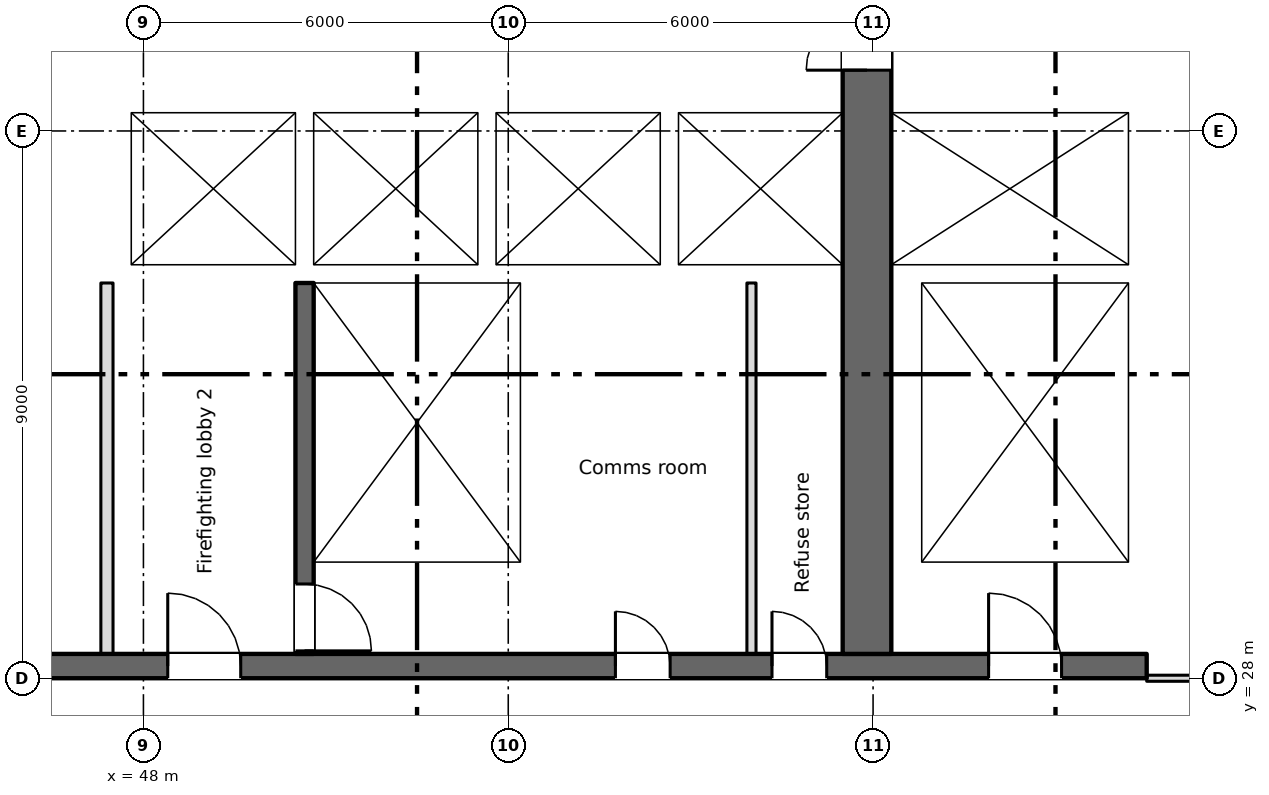
"""IFC4 building model, lengths in metres.
Left out: names, types, materials, properties, quantities, classifications, styles, units other than length and angle.
Written with IfcOpenShell. Run it as: python <this file> out.ifc"""

import sys

from ifc_helpers import new_model, si_unit, direction, frame, frame_2d, origin, place, context, subcontext, project, spatial, rectangle, extrude, element, fill, save


model = new_model("IFC4")
c1 = context("Model", 3, precision=1e-05, world=origin(), true_north=direction((0.0, 1.0)))
c2 = subcontext(c1, "Body", "Model", "MODEL_VIEW")
j1 = project(units=[si_unit("LENGTHUNIT", "METRE"), si_unit("PLANEANGLEUNIT", "RADIAN")], contexts=[c1])
p1 = place(None, origin())
s1 = spatial("IfcSite", under=j1, at=p1, CompositionType="ELEMENT")
p2 = place(p1, origin())
s2 = spatial("IfcBuilding", under=s1, at=p2, CompositionType="ELEMENT")
p3 = place(p2, frame((0.0, 0.0, 128.75)))
s3 = spatial("IfcBuildingStorey", under=s2, at=p3, CompositionType="ELEMENT", Elevation=128.75)
p4 = place(p3, frame((6.7, 28.2, 0.0), z_axis=(0.0, 0.0, 1.0), x_axis=(1.0, 0.0, 0.0)))
e1 = element("IfcWall", 1, at=p4, inside=s3, PredefinedType="SHEAR", context=c2, shape_type="SweptSolid", body=[
    extrude(rectangle(XDim=57.8, YDim=0.4, at=frame_2d((28.9, 0.0))), origin(), (0.0, 0.0, 1.0), 3.35),
])
p5 = place(p4, frame((12.062, 0.0, 0.0)))
e2 = element("IfcOpeningElement", 2, at=p5, cuts=e1, PredefinedType="OPENING", context=c2, shape_type="SweptSolid", body=[
    extrude(rectangle(XDim=0.9, YDim=2.1, at=frame_2d((0.45, 1.05))), frame((0.0, 0.21, 0.0), z_axis=(0.0, -1.0, 0.0), x_axis=(1.0, 0.0, 0.0)), (0.0, 0.0, 1.0), 0.42),
])
p6 = place(p4, frame((14.637, 0.0, 0.0)))
e3 = element("IfcOpeningElement", 3, at=p6, cuts=e1, PredefinedType="OPENING", context=c2, shape_type="SweptSolid", body=[
    extrude(rectangle(XDim=0.9, YDim=2.1, at=frame_2d((0.45, 1.05))), frame((0.0, 0.21, 0.0), z_axis=(0.0, -1.0, 0.0), x_axis=(1.0, 0.0, 0.0)), (0.0, 0.0, 1.0), 0.42),
])
p7 = place(p4, frame((49.062, 0.0, 0.0)))
e4 = element("IfcOpeningElement", 4, at=p7, cuts=e1, PredefinedType="OPENING", context=c2, shape_type="SweptSolid", body=[
    extrude(rectangle(XDim=0.9, YDim=2.1, at=frame_2d((0.45, 1.05))), frame((0.0, 0.21, 0.0), z_axis=(0.0, -1.0, 0.0), x_axis=(1.0, 0.0, 0.0)), (0.0, 0.0, 1.0), 0.42),
])
p8 = place(p4, frame((51.637, 0.0, 0.0)))
e5 = element("IfcOpeningElement", 5, at=p8, cuts=e1, PredefinedType="OPENING", context=c2, shape_type="SweptSolid", body=[
    extrude(rectangle(XDim=0.9, YDim=2.1, at=frame_2d((0.45, 1.05))), frame((0.0, 0.21, 0.0), z_axis=(0.0, -1.0, 0.0), x_axis=(1.0, 0.0, 0.0)), (0.0, 0.0, 1.0), 0.42),
])
p9 = place(p4, frame((1.35, 0.0, 0.0)))
e6 = element("IfcOpeningElement", 6, at=p9, cuts=e1, PredefinedType="OPENING", context=c2, shape_type="SweptSolid", body=[
    extrude(rectangle(XDim=0.9, YDim=2.1, at=frame_2d((0.45, 1.05))), frame((0.0, 0.21, 0.0), z_axis=(0.0, -1.0, 0.0), x_axis=(1.0, 0.0, 0.0)), (0.0, 0.0, 1.0), 0.42),
])
p10 = place(p4, frame((4.7, 0.0, 0.0)))
e7 = element("IfcOpeningElement", 7, at=p10, cuts=e1, PredefinedType="OPENING", context=c2, shape_type="SweptSolid", body=[
    extrude(rectangle(XDim=1.2, YDim=2.1, at=frame_2d((0.6, 1.05))), frame((0.0, 0.21, 0.0), z_axis=(0.0, -1.0, 0.0), x_axis=(1.0, 0.0, 0.0)), (0.0, 0.0, 1.0), 0.42),
])
p11 = place(p4, frame((31.7, 0.0, 0.0)))
e8 = element("IfcOpeningElement", 8, at=p11, cuts=e1, PredefinedType="OPENING", context=c2, shape_type="SweptSolid", body=[
    extrude(rectangle(XDim=1.2, YDim=2.1, at=frame_2d((0.6, 1.05))), frame((0.0, 0.21, 0.0), z_axis=(0.0, -1.0, 0.0), x_axis=(1.0, 0.0, 0.0)), (0.0, 0.0, 1.0), 0.42),
])
p12 = place(p4, frame((55.2, 0.0, 0.0)))
e9 = element("IfcOpeningElement", 9, at=p12, cuts=e1, PredefinedType="OPENING", context=c2, shape_type="SweptSolid", body=[
    extrude(rectangle(XDim=1.2, YDim=2.1, at=frame_2d((0.6, 1.05))), frame((0.0, 0.21, 0.0), z_axis=(0.0, -1.0, 0.0), x_axis=(1.0, 0.0, 0.0)), (0.0, 0.0, 1.0), 0.42),
])
p13 = place(p4, frame((21.7, 0.0, 0.0)))
e10 = element("IfcOpeningElement", 10, at=p13, cuts=e1, PredefinedType="OPENING", context=c2, shape_type="SweptSolid", body=[
    extrude(rectangle(XDim=1.2, YDim=2.1, at=frame_2d((0.6, 1.05))), frame((0.0, 0.21, 0.0), z_axis=(0.0, -1.0, 0.0), x_axis=(1.0, 0.0, 0.0)), (0.0, 0.0, 1.0), 0.42),
])
p14 = place(p4, frame((41.7, 0.0, 0.0)))
e11 = element("IfcOpeningElement", 11, at=p14, cuts=e1, PredefinedType="OPENING", context=c2, shape_type="SweptSolid", body=[
    extrude(rectangle(XDim=1.2, YDim=2.1, at=frame_2d((0.6, 1.05))), frame((0.0, 0.21, 0.0), z_axis=(0.0, -1.0, 0.0), x_axis=(1.0, 0.0, 0.0)), (0.0, 0.0, 1.0), 0.42),
])
p15 = place(p4, frame((24.85, 0.0, 0.0)))
e12 = element("IfcOpeningElement", 12, at=p15, cuts=e1, PredefinedType="OPENING", context=c2, shape_type="SweptSolid", body=[
    extrude(rectangle(XDim=2.4, YDim=2.1, at=frame_2d((1.2, 1.05))), frame((0.0, 0.21, 0.0), z_axis=(0.0, -1.0, 0.0), x_axis=(1.0, 0.0, 0.0)), (0.0, 0.0, 1.0), 0.42),
])
p16 = place(p4, frame((37.35, 0.0, 0.0)))
e13 = element("IfcOpeningElement", 13, at=p16, cuts=e1, PredefinedType="OPENING", context=c2, shape_type="SweptSolid", body=[
    extrude(rectangle(XDim=2.4, YDim=2.1, at=frame_2d((1.2, 1.05))), frame((0.0, 0.21, 0.0), z_axis=(0.0, -1.0, 0.0), x_axis=(1.0, 0.0, 0.0)), (0.0, 0.0, 1.0), 0.42),
])
p17 = place(p4, frame((7.95, 0.0, 0.0)))
e14 = element("IfcOpeningElement", 14, at=p17, cuts=e1, PredefinedType="OPENING", context=c2, shape_type="SweptSolid", body=[
    extrude(rectangle(XDim=2.4, YDim=2.1, at=frame_2d((1.2, 1.05))), frame((0.0, 0.21, 0.0), z_axis=(0.0, -1.0, 0.0), x_axis=(1.0, 0.0, 0.0)), (0.0, 0.0, 1.0), 0.42),
])
p18 = place(p4, frame((28.85, 0.0, 0.0)))
e15 = element("IfcOpeningElement", 15, at=p18, cuts=e1, PredefinedType="OPENING", context=c2, shape_type="SweptSolid", body=[
    extrude(rectangle(XDim=0.9, YDim=2.1, at=frame_2d((0.45, 1.05))), frame((0.0, 0.21, 0.0), z_axis=(0.0, -1.0, 0.0), x_axis=(1.0, 0.0, 0.0)), (0.0, 0.0, 1.0), 0.42),
])
p19 = place(p4, frame((34.85, 0.0, 0.0)))
e16 = element("IfcOpeningElement", 16, at=p19, cuts=e1, PredefinedType="OPENING", context=c2, shape_type="SweptSolid", body=[
    extrude(rectangle(XDim=0.9, YDim=2.1, at=frame_2d((0.45, 1.05))), frame((0.0, 0.21, 0.0), z_axis=(0.0, -1.0, 0.0), x_axis=(1.0, 0.0, 0.0)), (0.0, 0.0, 1.0), 0.42),
])
p20 = place(p3, frame((64.35, 34.8, 0.0), z_axis=(0.0, 0.0, 1.0), x_axis=(0.0, 1.0, 0.0)))
e17 = element("IfcWall", 17, at=p20, inside=s3, PredefinedType="SHEAR", context=c2, shape_type="SweptSolid", body=[
    extrude(rectangle(XDim=10.4, YDim=0.3, at=frame_2d((5.2, 0.0))), origin(), (0.0, 0.0, 1.0), 3.35),
])
p21 = place(p3, frame((59.9, 28.4, 0.0), z_axis=(0.0, 0.0, 1.0), x_axis=(0.0, 1.0, 0.0)))
e18 = element("IfcWall", 18, at=p21, inside=s3, PredefinedType="SHEAR", context=c2, shape_type="SweptSolid", body=[
    extrude(rectangle(XDim=16.8, YDim=0.8, at=frame_2d((8.4, 0.0))), origin(), (0.0, 0.0, 1.0), 3.35),
])
p22 = place(p21, frame((9.6, 0.0, 0.0)))
e19 = element("IfcOpeningElement", 19, at=p22, cuts=e18, PredefinedType="OPENING", context=c2, shape_type="SweptSolid", body=[
    extrude(rectangle(XDim=2.0, YDim=2.1, at=frame_2d((1.0, 1.05))), frame((0.0, 0.41, 0.0), z_axis=(0.0, -1.0, 0.0), x_axis=(1.0, 0.0, 0.0)), (0.0, 0.0, 1.0), 0.82),
])
p23 = place(p21, frame((15.35, 0.0, 0.0)))
e20 = element("IfcOpeningElement", 20, at=p23, cuts=e18, PredefinedType="OPENING", context=c2, shape_type="SweptSolid", body=[
    extrude(rectangle(XDim=1.2, YDim=2.1, at=frame_2d((0.6, 1.05))), frame((0.0, 0.41, 0.0), z_axis=(0.0, -1.0, 0.0), x_axis=(1.0, 0.0, 0.0)), (0.0, 0.0, 1.0), 0.82),
])
p24 = place(p3, frame((50.65, 34.5, 0.0), z_axis=(0.0, 0.0, 1.0), x_axis=(0.0, -1.0, 0.0)))
e21 = element("IfcWall", 21, at=p24, inside=s3, PredefinedType="SHEAR", context=c2, shape_type="SweptSolid", body=[
    extrude(rectangle(XDim=6.1, YDim=0.3, at=frame_2d((3.05, 0.0))), origin(), (0.0, 0.0, 1.0), 3.35),
])
p25 = place(p24, frame((4.95, 0.0, 0.0)))
e22 = element("IfcOpeningElement", 22, at=p25, cuts=e21, PredefinedType="OPENING", context=c2, shape_type="SweptSolid", body=[
    extrude(rectangle(XDim=1.1, YDim=2.1, at=frame_2d((0.55, 1.05))), frame((0.0, 0.16, 0.0), z_axis=(0.0, -1.0, 0.0), x_axis=(1.0, 0.0, 0.0)), (0.0, 0.0, 1.0), 0.32),
])
p26 = place(p3, frame((54.35, 28.4, 0.0), z_axis=(0.0, 0.0, 1.0), x_axis=(0.0, 1.0, 0.0)))
e23 = element("IfcWall", 23, at=p26, inside=s3, PredefinedType="SHEAR", context=c2, shape_type="SweptSolid", body=[
    extrude(rectangle(XDim=6.1, YDim=0.3, at=frame_2d((3.05, 0.0))), origin(), (0.0, 0.0, 1.0), 3.35),
])
p27 = place(p3, frame((60.55, 28.4, 0.0), z_axis=(0.0, 0.0, 1.0), x_axis=(0.0, 1.0, 0.0)))
e24 = element("IfcWall", 24, at=p27, inside=s3, PredefinedType="SHEAR", context=c2, shape_type="SweptSolid", body=[
    extrude(rectangle(XDim=6.1, YDim=0.5, at=frame_2d((3.05, 0.0))), origin(), (0.0, 0.0, 1.0), 3.35),
])
p28 = place(p3, frame((64.35, 28.4, 0.0), z_axis=(0.0, 0.0, 1.0), x_axis=(0.0, 1.0, 0.0)))
e25 = element("IfcWall", 25, at=p28, inside=s3, PredefinedType="SHEAR", context=c2, shape_type="SweptSolid", body=[
    extrude(rectangle(XDim=6.1, YDim=0.3, at=frame_2d((3.05, 0.0))), origin(), (0.0, 0.0, 1.0), 3.35),
])
p29 = place(p3, frame((47.3, 34.65, 0.0), z_axis=(0.0, 0.0, 1.0), x_axis=(1.0, 0.0, 0.0)))
e26 = element("IfcWall", 26, at=p29, inside=s3, PredefinedType="SHEAR", context=c2, shape_type="SweptSolid", body=[
    extrude(rectangle(XDim=12.2, YDim=0.3, at=frame_2d((6.1, 0.0))), origin(), (0.0, 0.0, 1.0), 3.35),
])
p30 = place(p29, frame((1.3, 0.0, 0.0)))
e27 = element("IfcOpeningElement", 27, at=p30, cuts=e26, PredefinedType="OPENING", context=c2, shape_type="SweptSolid", body=[
    extrude(rectangle(XDim=1.1, YDim=2.1, at=frame_2d((0.55, 1.05))), frame((0.0, 0.16, 0.0), z_axis=(0.0, -1.0, 0.0), x_axis=(1.0, 0.0, 0.0)), (0.0, 0.0, 1.0), 0.32),
])
p31 = place(p3, frame((60.3, 34.65, 0.0), z_axis=(0.0, 0.0, 1.0), x_axis=(1.0, 0.0, 0.0)))
e28 = element("IfcWall", 28, at=p31, inside=s3, PredefinedType="SHEAR", context=c2, shape_type="SweptSolid", body=[
    extrude(rectangle(XDim=4.2, YDim=0.3, at=frame_2d((2.1, 0.0))), origin(), (0.0, 0.0, 1.0), 3.35),
])
p32 = place(p3, frame((47.3, 37.45, 0.0), z_axis=(0.0, 0.0, 1.0), x_axis=(1.0, 0.0, 0.0)))
e29 = element("IfcWall", 29, at=p32, inside=s3, PredefinedType="SHEAR", context=c2, shape_type="SweptSolid", body=[
    extrude(rectangle(XDim=12.2, YDim=0.3, at=frame_2d((6.1, 0.0))), origin(), (0.0, 0.0, 1.0), 3.35),
])
p33 = place(p32, frame((4.3, 0.0, 0.0)))
e30 = element("IfcOpeningElement", 30, at=p33, cuts=e29, PredefinedType="OPENING", context=c2, shape_type="SweptSolid", body=[
    extrude(rectangle(XDim=1.1, YDim=2.1, at=frame_2d((0.55, 1.05))), frame((0.0, 0.16, 0.0), z_axis=(0.0, -1.0, 0.0), x_axis=(1.0, 0.0, 0.0)), (0.0, 0.0, 1.0), 0.32),
])
p34 = place(p32, frame((7.3, 0.0, 0.0)))
e31 = element("IfcOpeningElement", 31, at=p34, cuts=e29, PredefinedType="OPENING", context=c2, shape_type="SweptSolid", body=[
    extrude(rectangle(XDim=1.1, YDim=2.1, at=frame_2d((0.55, 1.05))), frame((0.0, 0.16, 0.0), z_axis=(0.0, -1.0, 0.0), x_axis=(1.0, 0.0, 0.0)), (0.0, 0.0, 1.0), 0.32),
])
p35 = place(p32, frame((10.3, 0.0, 0.0)))
e32 = element("IfcOpeningElement", 32, at=p35, cuts=e29, PredefinedType="OPENING", context=c2, shape_type="SweptSolid", body=[
    extrude(rectangle(XDim=1.1, YDim=2.1, at=frame_2d((0.55, 1.05))), frame((0.0, 0.16, 0.0), z_axis=(0.0, -1.0, 0.0), x_axis=(1.0, 0.0, 0.0)), (0.0, 0.0, 1.0), 0.32),
])
p36 = place(p3, frame((60.3, 37.45, 0.0), z_axis=(0.0, 0.0, 1.0), x_axis=(1.0, 0.0, 0.0)))
e33 = element("IfcWall", 33, at=p36, inside=s3, PredefinedType="SHEAR", context=c2, shape_type="SweptSolid", body=[
    extrude(rectangle(XDim=3.9, YDim=0.3, at=frame_2d((1.95, 0.0))), origin(), (0.0, 0.0, 1.0), 3.35),
])
p37 = place(p36, frame((1.4, 0.0, 0.0)))
e34 = element("IfcOpeningElement", 34, at=p37, cuts=e33, PredefinedType="OPENING", context=c2, shape_type="SweptSolid", body=[
    extrude(rectangle(XDim=1.1, YDim=2.1, at=frame_2d((0.55, 1.05))), frame((0.0, 0.16, 0.0), z_axis=(0.0, -1.0, 0.0), x_axis=(1.0, 0.0, 0.0)), (0.0, 0.0, 1.0), 0.32),
])
p38 = place(p3, frame((47.55, 34.8, 0.0), z_axis=(0.0, 0.0, 1.0), x_axis=(0.0, 1.0, 0.0)))
e35 = element("IfcWall", 35, at=p38, inside=s3, PredefinedType="SHEAR", context=c2, shape_type="SweptSolid", body=[
    extrude(rectangle(XDim=2.5, YDim=0.5, at=frame_2d((1.25, 0.0))), origin(), (0.0, 0.0, 1.0), 3.35),
])
for number, where, z_axis, x_axis in (
    (36, (50.65, 34.8, 0.0), (0.0, 0.0, 1.0), (0.0, 1.0, 0.0)),
    (37, (53.65, 34.8, 0.0), (0.0, 0.0, 1.0), (0.0, 1.0, 0.0)),
    (38, (56.65, 34.8, 0.0), (0.0, 0.0, 1.0), (0.0, 1.0, 0.0)),
):
    element("IfcWall", number, at=place(p3, frame(where, z_axis=z_axis, x_axis=x_axis)), inside=s3, PredefinedType="SHEAR", context=c2, shape_type="SweptSolid", body=[
        extrude(rectangle(XDim=2.5, YDim=0.3, at=frame_2d((1.25, 0.0))), origin(), (0.0, 0.0, 1.0), 3.35),
    ])
p39 = place(p3, frame((47.4, 28.4, 0.0), z_axis=(0.0, 0.0, 1.0), x_axis=(0.0, 1.0, 0.0)))
e39 = element("IfcWall", 39, at=p39, inside=s3, PredefinedType="PARTITIONING", context=c2, shape_type="SweptSolid", body=[
    extrude(rectangle(XDim=6.1, YDim=0.2, at=frame_2d((3.05, 0.0))), origin(), (0.0, 0.0, 1.0), 3.35),
])
p40 = place(p3, frame((58.0, 28.4, 0.0), z_axis=(0.0, 0.0, 1.0), x_axis=(0.0, 1.0, 0.0)))
e40 = element("IfcWall", 40, at=p40, inside=s3, PredefinedType="PARTITIONING", context=c2, shape_type="SweptSolid", body=[
    extrude(rectangle(XDim=6.1, YDim=0.15, at=frame_2d((3.05, 0.0))), origin(), (0.0, 0.0, 1.0), 3.35),
])
p41 = place(p3, frame((64.5, 28.0, 0.0), z_axis=(0.0, 0.0, 1.0), x_axis=(1.0, 0.0, 0.0)))
e41 = element("IfcWall", 41, at=p41, inside=s3, PredefinedType="PARTITIONING", context=c2, shape_type="SweptSolid", body=[
    extrude(rectangle(XDim=6.8, YDim=0.1, at=frame_2d((3.4, 0.0))), origin(), (0.0, 0.0, 1.0), 3.35),
])
p42 = place(p41, frame((2.5, 0.0, 0.0)))
e42 = element("IfcOpeningElement", 42, at=p42, cuts=e41, PredefinedType="OPENING", context=c2, shape_type="SweptSolid", body=[
    extrude(rectangle(XDim=1.8, YDim=2.1, at=frame_2d((0.9, 1.05))), frame((0.0, 0.06, 0.0), z_axis=(0.0, -1.0, 0.0), x_axis=(1.0, 0.0, 0.0)), (0.0, 0.0, 1.0), 0.12),
])
p43 = place(p7, origin())
e43 = element("IfcDoor", 43, at=p43, inside=s3, OperationType="SINGLE_SWING_LEFT", PredefinedType="DOOR", context=c2, shape_type="SweptSolid", body=[
    extrude(rectangle(XDim=0.9, YDim=2.1, at=frame_2d((0.45, 1.05))), frame((0.0, 0.025, 0.0), z_axis=(0.0, -1.0, 0.0), x_axis=(1.0, 0.0, 0.0)), (0.0, 0.0, 1.0), 0.05),
])
fill(e4, e43)
p44 = place(p8, origin())
e44 = element("IfcDoor", 44, at=p44, inside=s3, OperationType="SINGLE_SWING_LEFT", PredefinedType="DOOR", context=c2, shape_type="SweptSolid", body=[
    extrude(rectangle(XDim=0.9, YDim=2.1, at=frame_2d((0.45, 1.05))), frame((0.0, 0.025, 0.0), z_axis=(0.0, -1.0, 0.0), x_axis=(1.0, 0.0, 0.0)), (0.0, 0.0, 1.0), 0.05),
])
fill(e5, e44)
p45 = place(p33, origin())
e45 = element("IfcDoor", 45, at=p45, inside=s3, OperationType="SLIDING_TO_LEFT", PredefinedType="DOOR", context=c2, shape_type="SweptSolid", body=[
    extrude(rectangle(XDim=1.1, YDim=2.1, at=frame_2d((0.55, 1.05))), frame((0.0, 0.025, 0.0), z_axis=(0.0, -1.0, 0.0), x_axis=(1.0, 0.0, 0.0)), (0.0, 0.0, 1.0), 0.05),
])
fill(e30, e45)
p46 = place(p34, origin())
e46 = element("IfcDoor", 46, at=p46, inside=s3, OperationType="SLIDING_TO_LEFT", PredefinedType="DOOR", context=c2, shape_type="SweptSolid", body=[
    extrude(rectangle(XDim=1.1, YDim=2.1, at=frame_2d((0.55, 1.05))), frame((0.0, 0.025, 0.0), z_axis=(0.0, -1.0, 0.0), x_axis=(1.0, 0.0, 0.0)), (0.0, 0.0, 1.0), 0.05),
])
fill(e31, e46)
p47 = place(p35, origin())
e47 = element("IfcDoor", 47, at=p47, inside=s3, OperationType="SLIDING_TO_LEFT", PredefinedType="DOOR", context=c2, shape_type="SweptSolid", body=[
    extrude(rectangle(XDim=1.1, YDim=2.1, at=frame_2d((0.55, 1.05))), frame((0.0, 0.025, 0.0), z_axis=(0.0, -1.0, 0.0), x_axis=(1.0, 0.0, 0.0)), (0.0, 0.0, 1.0), 0.05),
])
fill(e32, e47)
p48 = place(p37, origin())
e48 = element("IfcDoor", 48, at=p48, inside=s3, OperationType="SLIDING_TO_LEFT", PredefinedType="DOOR", context=c2, shape_type="SweptSolid", body=[
    extrude(rectangle(XDim=1.1, YDim=2.1, at=frame_2d((0.55, 1.05))), frame((0.0, 0.025, 0.0), z_axis=(0.0, -1.0, 0.0), x_axis=(1.0, 0.0, 0.0)), (0.0, 0.0, 1.0), 0.05),
])
fill(e34, e48)
p49 = place(p30, origin())
e49 = element("IfcDoor", 49, at=p49, inside=s3, OperationType="SLIDING_TO_LEFT", PredefinedType="DOOR", context=c2, shape_type="SweptSolid", body=[
    extrude(rectangle(XDim=1.1, YDim=2.1, at=frame_2d((0.55, 1.05))), frame((0.0, 0.025, 0.0), z_axis=(0.0, -1.0, 0.0), x_axis=(1.0, 0.0, 0.0)), (0.0, 0.0, 1.0), 0.05),
])
fill(e27, e49)
p50 = place(p25, origin())
e50 = element("IfcDoor", 50, at=p50, inside=s3, OperationType="SINGLE_SWING_RIGHT", PredefinedType="DOOR", context=c2, shape_type="SweptSolid", body=[
    extrude(rectangle(XDim=1.1, YDim=2.1, at=frame_2d((0.55, 1.05))), frame((0.0, 0.025, 0.0), z_axis=(0.0, -1.0, 0.0), x_axis=(1.0, 0.0, 0.0)), (0.0, 0.0, 1.0), 0.05),
])
fill(e22, e50)
p51 = place(p12, origin())
e51 = element("IfcDoor", 51, at=p51, inside=s3, OperationType="SINGLE_SWING_LEFT", PredefinedType="DOOR", context=c2, shape_type="SweptSolid", body=[
    extrude(rectangle(XDim=1.2, YDim=2.1, at=frame_2d((0.6, 1.05))), frame((0.0, 0.025, 0.0), z_axis=(0.0, -1.0, 0.0), x_axis=(1.0, 0.0, 0.0)), (0.0, 0.0, 1.0), 0.05),
])
fill(e9, e51)
p52 = place(p14, origin())
e52 = element("IfcDoor", 52, at=p52, inside=s3, OperationType="SINGLE_SWING_LEFT", PredefinedType="DOOR", context=c2, shape_type="SweptSolid", body=[
    extrude(rectangle(XDim=1.2, YDim=2.1, at=frame_2d((0.6, 1.05))), frame((0.0, 0.025, 0.0), z_axis=(0.0, -1.0, 0.0), x_axis=(1.0, 0.0, 0.0)), (0.0, 0.0, 1.0), 0.05),
])
fill(e11, e52)
p53 = place(p22, origin())
e53 = element("IfcDoor", 53, at=p53, inside=s3, OperationType="DOUBLE_DOOR_SINGLE_SWING", PredefinedType="DOOR", context=c2, shape_type="SweptSolid", body=[
    extrude(rectangle(XDim=2.0, YDim=2.1, at=frame_2d((1.0, 1.05))), frame((0.0, 0.025, 0.0), z_axis=(0.0, -1.0, 0.0), x_axis=(1.0, 0.0, 0.0)), (0.0, 0.0, 1.0), 0.05),
])
fill(e19, e53)
save(model, sys.argv[1])
